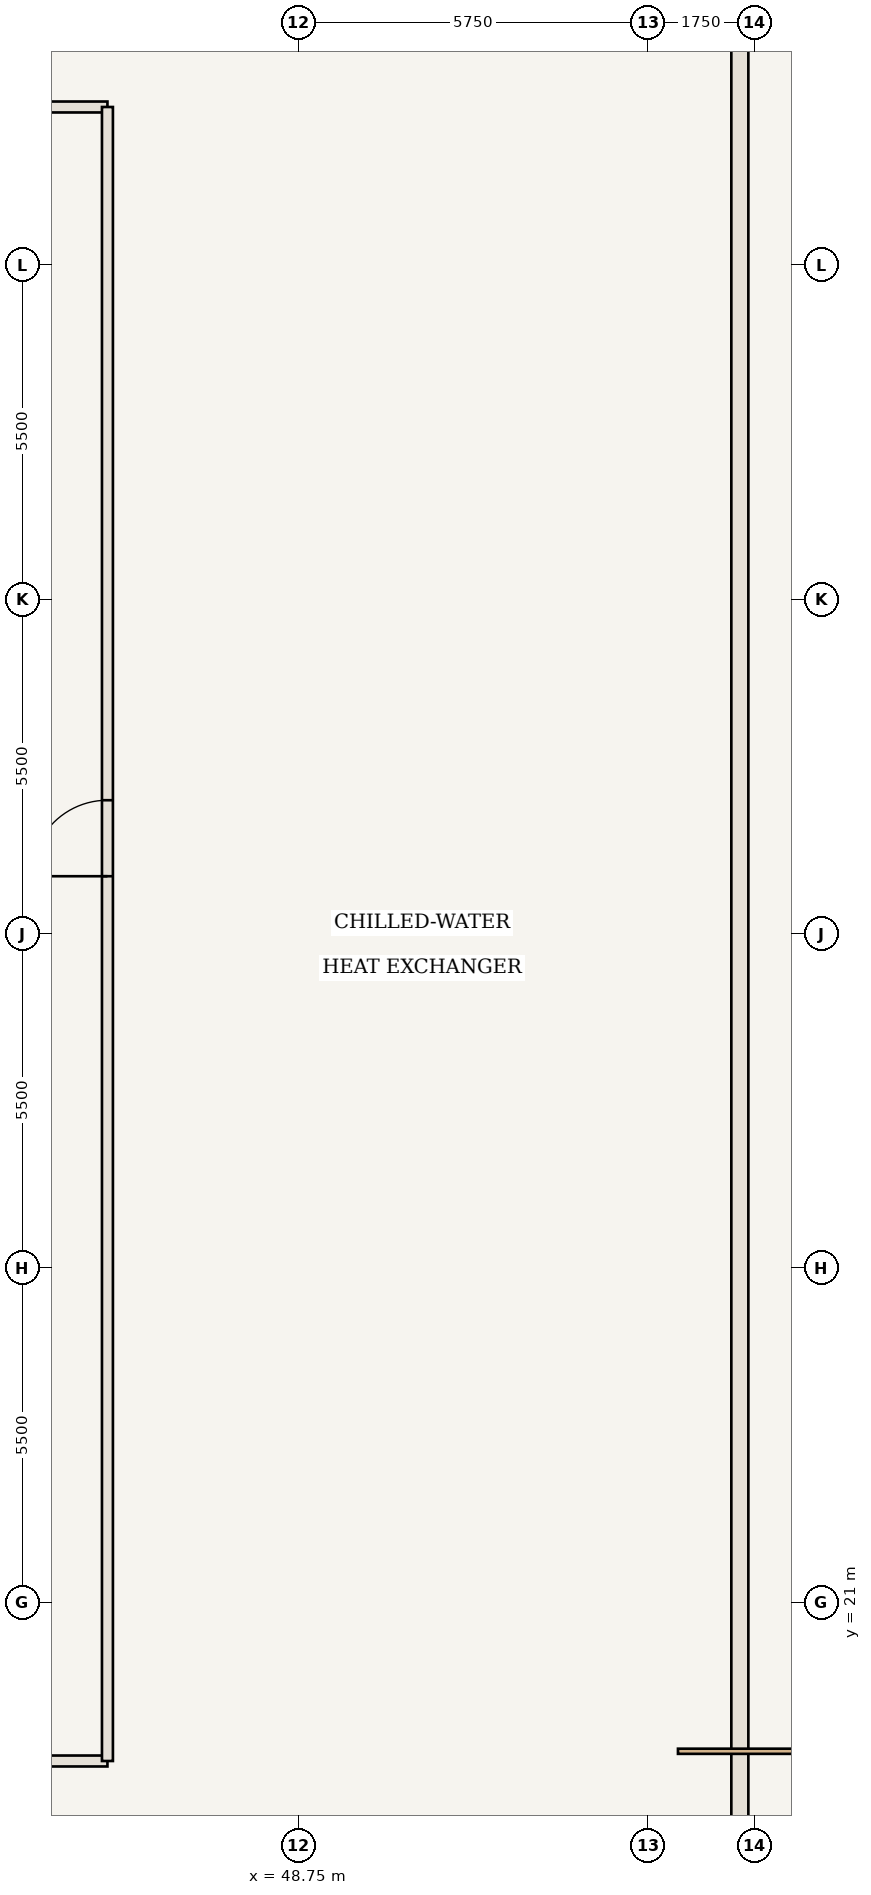
"""IFC4 building model, lengths in metres.
Left out: names, types, materials, properties, quantities, classifications, styles, units other than length and angle.
Written with IfcOpenShell. Run it as: python <this file> out.ifc"""

import sys

from ifc_helpers import new_model, si_unit, direction, frame, frame_2d, origin, place, context, subcontext, project, spatial, rectangle, extrude, element, fill, save


model = new_model("IFC4")
c1 = context("Model", 3, precision=1e-05, world=origin(), true_north=direction((0.0, 1.0)))
c2 = subcontext(c1, "Body", "Model", "MODEL_VIEW")
j1 = project(units=[si_unit("LENGTHUNIT", "METRE"), si_unit("PLANEANGLEUNIT", "RADIAN")], contexts=[c1])
p1 = place(None, origin())
s1 = spatial("IfcSite", under=j1, at=p1, CompositionType="ELEMENT")
p2 = place(p1, origin())
s2 = spatial("IfcBuilding", under=s1, at=p2, CompositionType="ELEMENT")
p3 = place(p2, frame((0.0, 0.0, 77.35)))
s3 = spatial("IfcBuildingStorey", under=s2, at=p3, CompositionType="ELEMENT", Elevation=77.35)
p4 = place(p3, frame((18.4, 18.4, 0.0), z_axis=(0.0, 0.0, 1.0), x_axis=(1.0, 0.0, 0.0)))
e1 = element("IfcWall", 1, at=p4, inside=s3, PredefinedType="STANDARD", context=c2, shape_type="SweptSolid", body=[
    extrude(rectangle(XDim=27.2, YDim=0.18, at=frame_2d((13.6, 0.0))), origin(), (0.0, 0.0, 1.0), 4.72),
])
p5 = place(p4, frame((4.4, 0.0, 0.0)))
e2 = element("IfcOpeningElement", 2, at=p5, cuts=e1, PredefinedType="OPENING", context=c2, shape_type="SweptSolid", body=[
    extrude(rectangle(XDim=1.25, YDim=2.2, at=frame_2d((0.625, 1.1))), frame((0.0, 0.1, 0.0), z_axis=(0.0, -1.0, 0.0), x_axis=(1.0, 0.0, 0.0)), (0.0, 0.0, 1.0), 0.2),
])
p6 = place(p3, frame((18.4, 45.6, 0.0), z_axis=(0.0, 0.0, 1.0), x_axis=(1.0, 0.0, 0.0)))
e3 = element("IfcWall", 3, at=p6, inside=s3, PredefinedType="STANDARD", context=c2, shape_type="SweptSolid", body=[
    extrude(rectangle(XDim=27.2, YDim=0.18, at=frame_2d((13.6, 0.0))), origin(), (0.0, 0.0, 1.0), 4.72),
])
p7 = place(p6, frame((4.4, 0.0, 0.0)))
e4 = element("IfcOpeningElement", 4, at=p7, cuts=e3, PredefinedType="OPENING", context=c2, shape_type="SweptSolid", body=[
    extrude(rectangle(XDim=1.25, YDim=2.2, at=frame_2d((0.625, 1.1))), frame((0.0, 0.1, 0.0), z_axis=(0.0, -1.0, 0.0), x_axis=(1.0, 0.0, 0.0)), (0.0, 0.0, 1.0), 0.2),
])
p8 = place(p3, frame((45.6, 18.4, 0.0), z_axis=(0.0, 0.0, 1.0), x_axis=(0.0, 1.0, 0.0)))
e5 = element("IfcWall", 5, at=p8, inside=s3, PredefinedType="STANDARD", context=c2, shape_type="SweptSolid", body=[
    extrude(rectangle(XDim=27.2, YDim=0.18, at=frame_2d((13.6, 0.0))), origin(), (0.0, 0.0, 1.0), 4.72),
])
p9 = place(p8, frame((14.55, 0.0, 0.0)))
e6 = element("IfcOpeningElement", 6, at=p9, cuts=e5, PredefinedType="OPENING", context=c2, shape_type="SweptSolid", body=[
    extrude(rectangle(XDim=1.25, YDim=2.2, at=frame_2d((0.625, 1.1))), frame((0.0, 0.1, 0.0), z_axis=(0.0, -1.0, 0.0), x_axis=(1.0, 0.0, 0.0)), (0.0, 0.0, 1.0), 0.2),
])
p10 = place(p3, frame((56.0, 56.0, 0.0), z_axis=(0.0, 0.0, 1.0), x_axis=(0.0, -1.0, 0.0)))
e7 = element("IfcWall", 7, at=p10, inside=s3, PredefinedType="USERDEFINED", context=c2, shape_type="SweptSolid", body=[
    extrude(rectangle(XDim=48.0, YDim=0.28, at=frame_2d((24.0, 0.0))), origin(), (0.0, 0.0, 1.0), 3.92),
])
p11 = place(p9, origin())
e8 = element("IfcDoor", 8, at=p11, inside=s3, OperationType="SINGLE_SWING_LEFT", PredefinedType="DOOR", context=c2, shape_type="SweptSolid", body=[
    extrude(rectangle(XDim=1.25, YDim=2.2, at=frame_2d((0.625, 1.1))), frame((0.0, 0.025, 0.0), z_axis=(0.0, -1.0, 0.0), x_axis=(1.0, 0.0, 0.0)), (0.0, 0.0, 1.0), 0.05),
])
fill(e6, e8)
save(model, sys.argv[1])
